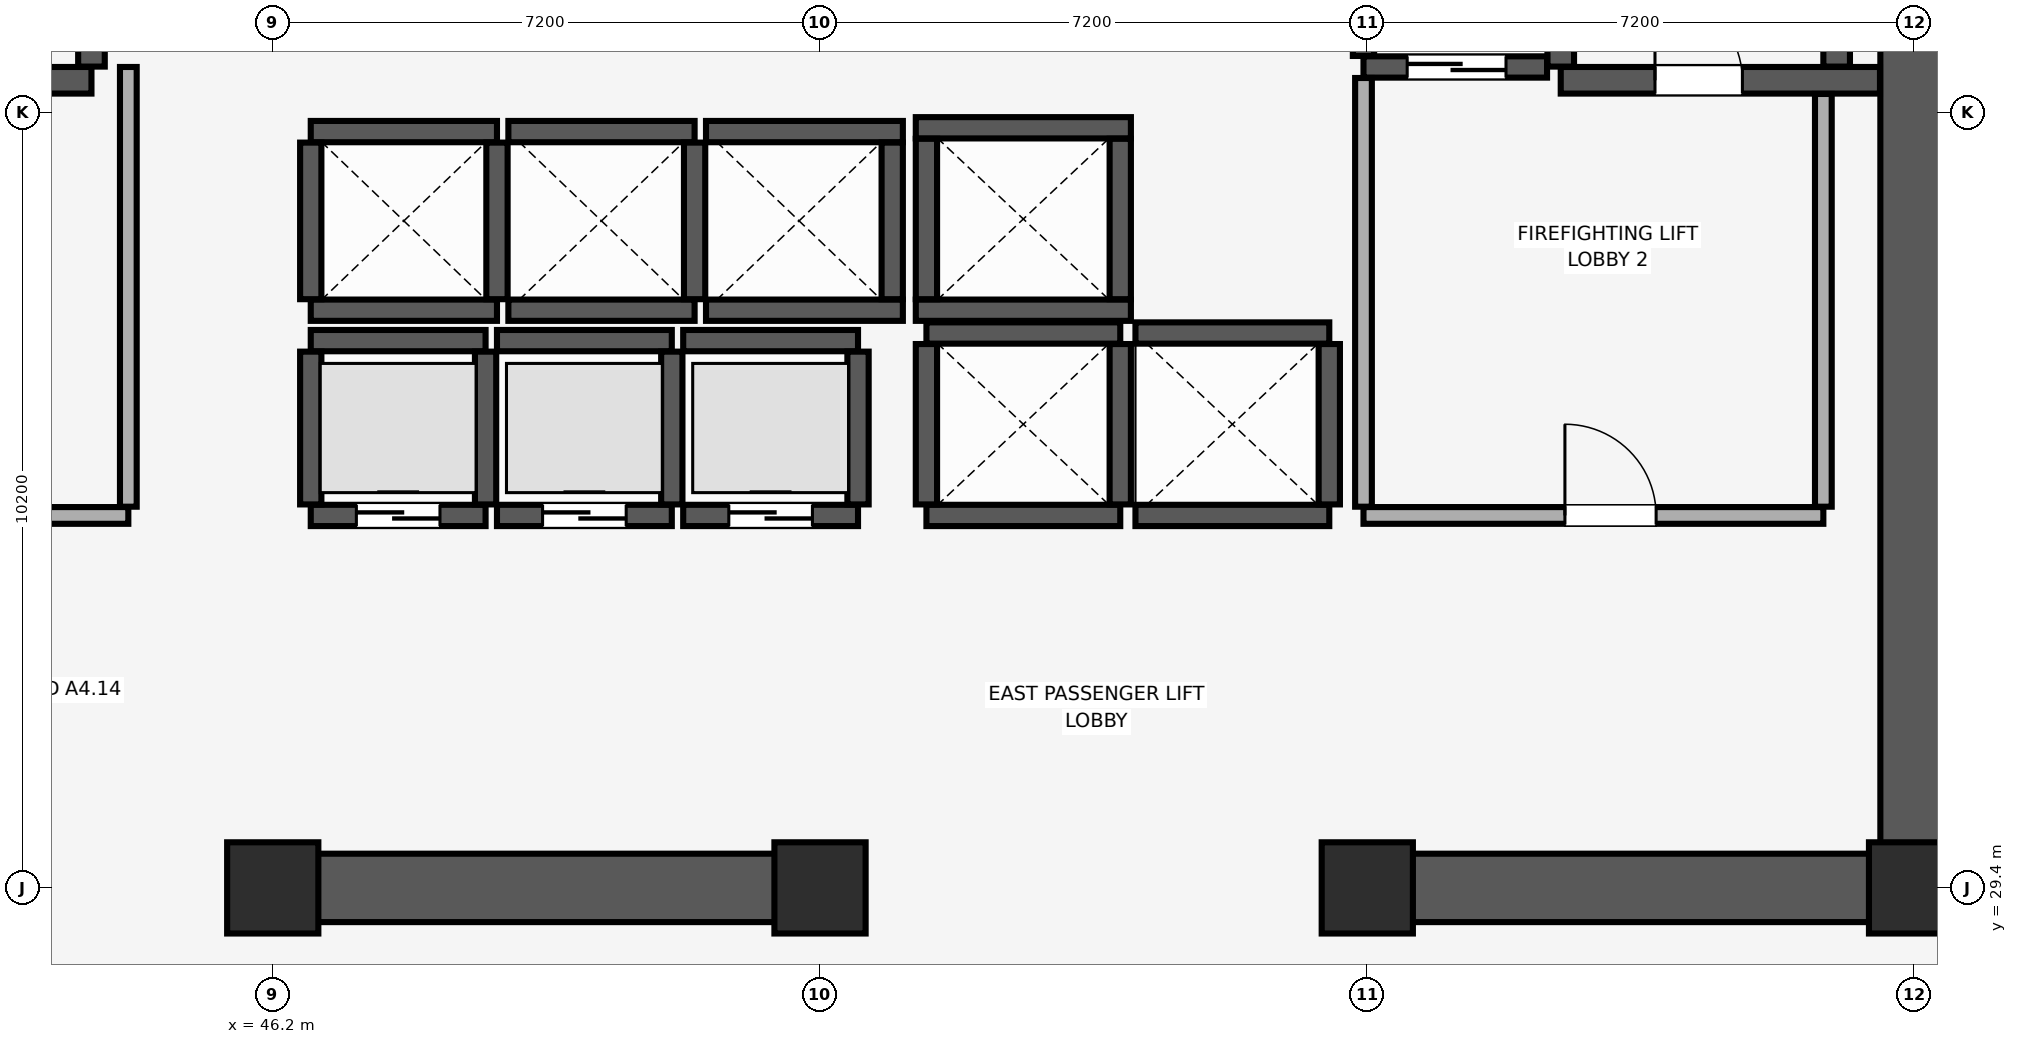
"""IFC4 building model, lengths in metres.
Left out: names, types, materials, properties, quantities, classifications, styles, units other than length and angle.
Written with IfcOpenShell. Run it as: python <this file> out.ifc"""

import sys

from ifc_helpers import new_model, si_unit, direction, frame, frame_2d, origin, origin_2d, place, context, subcontext, project, spatial, rectangle, extrude, element, fill, save


model = new_model("IFC4")
c1 = context("Model", 3, precision=1e-05, world=origin(), true_north=direction((0.0, 1.0)))
c2 = subcontext(c1, "Body", "Model", "MODEL_VIEW")
j1 = project(units=[si_unit("LENGTHUNIT", "METRE"), si_unit("PLANEANGLEUNIT", "RADIAN")], contexts=[c1])
p1 = place(None, origin())
s1 = spatial("IfcSite", under=j1, at=p1, CompositionType="ELEMENT")
p2 = place(p1, origin())
s2 = spatial("IfcBuilding", under=s1, at=p2, CompositionType="ELEMENT")
p3 = place(p2, frame((0.0, 0.0, 184.75)))
s3 = spatial("IfcBuildingStorey", under=s2, at=p3, CompositionType="ELEMENT", Elevation=184.75)
for number, where, z_axis, x_axis in (
    (1, (46.2, 29.4, 0.0), (0.0, 0.0, 1.0), (1.0, 0.0, 0.0)),
    (2, (53.4, 29.4, 0.0), (0.0, 0.0, 1.0), (1.0, 0.0, 0.0)),
    (3, (60.6, 29.4, 0.0), (0.0, 0.0, 1.0), (1.0, 0.0, 0.0)),
    (4, (67.8, 29.4, 0.0), (0.0, 0.0, 1.0), (1.0, 0.0, 0.0)),
):
    element("IfcColumn", number, at=place(p3, frame(where, z_axis=z_axis, x_axis=x_axis)), inside=s3, PredefinedType="COLUMN", context=c2, shape_type="SweptSolid", body=[
        extrude(rectangle(XDim=1.2, YDim=1.2, at=origin_2d()), origin(), (0.0, 0.0, 1.0), 5.16),
    ])
p4 = place(p3, frame((67.8, 29.4, 0.0), z_axis=(0.0, 0.0, 1.0), x_axis=(0.0, 1.0, 0.0)))
e5 = element("IfcWall", 5, at=p4, inside=s3, PredefinedType="SHEAR", context=c2, shape_type="SweptSolid", body=[
    extrude(rectangle(XDim=19.2, YDim=0.9, at=frame_2d((9.6, 0.0))), origin(), (0.0, 0.0, 1.0), 5.16),
])
p5 = place(p3, frame((46.0, 29.4, 0.0), z_axis=(0.0, 0.0, 1.0), x_axis=(1.0, 0.0, 0.0)))
e6 = element("IfcWall", 6, at=p5, inside=s3, PredefinedType="SHEAR", context=c2, shape_type="SweptSolid", body=[
    extrude(rectangle(XDim=7.6, YDim=0.9, at=frame_2d((3.8, 0.0))), origin(), (0.0, 0.0, 1.0), 5.16),
])
p6 = place(p3, frame((60.4, 29.4, 0.0), z_axis=(0.0, 0.0, 1.0), x_axis=(1.0, 0.0, 0.0)))
e7 = element("IfcWall", 7, at=p6, inside=s3, PredefinedType="SHEAR", context=c2, shape_type="SweptSolid", body=[
    extrude(rectangle(XDim=6.945, YDim=0.9, at=frame_2d((3.473, 0.0))), origin(), (0.0, 0.0, 1.0), 5.16),
])
p7 = place(p3, frame((40.185, 40.025, 0.0), z_axis=(0.0, 0.0, 1.0), x_axis=(1.0, 0.0, 0.0)))
e8 = element("IfcWall", 8, at=p7, inside=s3, PredefinedType="SHEAR", context=c2, shape_type="SweptSolid", body=[
    extrude(rectangle(XDim=3.63, YDim=0.35, at=frame_2d((1.815, 0.0))), origin(), (0.0, 0.0, 1.0), 5.16),
])
p8 = place(p7, frame((1.24, 0.0, 0.0)))
e9 = element("IfcOpeningElement", 9, at=p8, cuts=e8, PredefinedType="OPENING", context=c2, shape_type="SweptSolid", body=[
    extrude(rectangle(XDim=1.15, YDim=2.15, at=frame_2d((0.575, 1.075))), frame((0.0, 0.185, 0.0), z_axis=(0.0, -1.0, 0.0), x_axis=(1.0, 0.0, 0.0)), (0.0, 0.0, 1.0), 0.37),
])
p9 = place(p3, frame((43.815, 40.205, 0.0), z_axis=(0.0, 0.0, 1.0), x_axis=(0.0, 1.0, 0.0)))
e10 = element("IfcWall", 10, at=p9, inside=s3, PredefinedType="SHEAR", context=c2, shape_type="SweptSolid", body=[
    extrude(rectangle(XDim=8.09, YDim=0.35, at=frame_2d((4.045, 0.0))), origin(), (0.0, 0.0, 1.0), 5.16),
])
p10 = place(p3, frame((63.145, 40.025, 0.0), z_axis=(0.0, 0.0, 1.0), x_axis=(1.0, 0.0, 0.0)))
e11 = element("IfcWall", 11, at=p10, inside=s3, PredefinedType="SHEAR", context=c2, shape_type="SweptSolid", body=[
    extrude(rectangle(XDim=4.2, YDim=0.35, at=frame_2d((2.1, 0.0))), origin(), (0.0, 0.0, 1.0), 5.16),
])
p11 = place(p10, frame((1.24, 0.0, 0.0)))
e12 = element("IfcOpeningElement", 12, at=p11, cuts=e11, PredefinedType="OPENING", context=c2, shape_type="SweptSolid", body=[
    extrude(rectangle(XDim=1.15, YDim=2.15, at=frame_2d((0.575, 1.075))), frame((0.0, 0.185, 0.0), z_axis=(0.0, -1.0, 0.0), x_axis=(1.0, 0.0, 0.0)), (0.0, 0.0, 1.0), 0.37),
])
for number, where, z_axis, x_axis in (
    (13, (63.145, 40.205, 0.0), (0.0, 0.0, 1.0), (0.0, 1.0, 0.0)),
    (14, (66.775, 40.205, 0.0), (0.0, 0.0, 1.0), (0.0, 1.0, 0.0)),
):
    element("IfcWall", number, at=place(p3, frame(where, z_axis=z_axis, x_axis=x_axis)), inside=s3, PredefinedType="SHEAR", context=c2, shape_type="SweptSolid", body=[
        extrude(rectangle(XDim=8.09, YDim=0.35, at=frame_2d((4.045, 0.0))), origin(), (0.0, 0.0, 1.0), 5.16),
    ])
p12 = place(p3, frame((46.7, 34.3, 0.0), z_axis=(0.0, 0.0, 1.0), x_axis=(1.0, 0.0, 0.0)))
e15 = element("IfcWall", 15, at=p12, inside=s3, PredefinedType="SHEAR", context=c2, shape_type="SweptSolid", body=[
    extrude(rectangle(XDim=2.3, YDim=0.28, at=frame_2d((1.15, 0.0))), origin(), (0.0, 0.0, 1.0), 5.16),
])
p13 = place(p12, frame((0.6, 0.0, 0.0)))
e16 = element("IfcOpeningElement", 16, at=p13, cuts=e15, PredefinedType="OPENING", context=c2, shape_type="SweptSolid", body=[
    extrude(rectangle(XDim=1.1, YDim=2.2, at=frame_2d((0.55, 1.1))), frame((0.0, 0.15, 0.0), z_axis=(0.0, -1.0, 0.0), x_axis=(1.0, 0.0, 0.0)), (0.0, 0.0, 1.0), 0.3),
])
p14 = place(p3, frame((46.7, 36.6, 0.0), z_axis=(0.0, 0.0, 1.0), x_axis=(1.0, 0.0, 0.0)))
e17 = element("IfcWall", 17, at=p14, inside=s3, PredefinedType="SHEAR", context=c2, shape_type="SweptSolid", body=[
    extrude(rectangle(XDim=2.3, YDim=0.28, at=frame_2d((1.15, 0.0))), origin(), (0.0, 0.0, 1.0), 5.16),
])
for number, where, z_axis, x_axis in (
    (18, (46.7, 34.445, 0.0), (0.0, 0.0, 1.0), (0.0, 1.0, 0.0)),
    (19, (49.0, 34.445, 0.0), (0.0, 0.0, 1.0), (0.0, 1.0, 0.0)),
):
    element("IfcWall", number, at=place(p3, frame(where, z_axis=z_axis, x_axis=x_axis)), inside=s3, PredefinedType="SHEAR", context=c2, shape_type="SweptSolid", body=[
        extrude(rectangle(XDim=2.01, YDim=0.28, at=frame_2d((1.005, 0.0))), origin(), (0.0, 0.0, 1.0), 5.16),
    ])
p15 = place(p3, frame((49.15, 34.3, 0.0), z_axis=(0.0, 0.0, 1.0), x_axis=(1.0, 0.0, 0.0)))
e20 = element("IfcWall", 20, at=p15, inside=s3, PredefinedType="SHEAR", context=c2, shape_type="SweptSolid", body=[
    extrude(rectangle(XDim=2.3, YDim=0.28, at=frame_2d((1.15, 0.0))), origin(), (0.0, 0.0, 1.0), 5.16),
])
p16 = place(p15, frame((0.6, 0.0, 0.0)))
e21 = element("IfcOpeningElement", 21, at=p16, cuts=e20, PredefinedType="OPENING", context=c2, shape_type="SweptSolid", body=[
    extrude(rectangle(XDim=1.1, YDim=2.2, at=frame_2d((0.55, 1.1))), frame((0.0, 0.15, 0.0), z_axis=(0.0, -1.0, 0.0), x_axis=(1.0, 0.0, 0.0)), (0.0, 0.0, 1.0), 0.3),
])
p17 = place(p3, frame((49.15, 36.6, 0.0), z_axis=(0.0, 0.0, 1.0), x_axis=(1.0, 0.0, 0.0)))
e22 = element("IfcWall", 22, at=p17, inside=s3, PredefinedType="SHEAR", context=c2, shape_type="SweptSolid", body=[
    extrude(rectangle(XDim=2.3, YDim=0.28, at=frame_2d((1.15, 0.0))), origin(), (0.0, 0.0, 1.0), 5.16),
])
p18 = place(p3, frame((51.45, 34.445, 0.0), z_axis=(0.0, 0.0, 1.0), x_axis=(0.0, 1.0, 0.0)))
e23 = element("IfcWall", 23, at=p18, inside=s3, PredefinedType="SHEAR", context=c2, shape_type="SweptSolid", body=[
    extrude(rectangle(XDim=2.01, YDim=0.28, at=frame_2d((1.005, 0.0))), origin(), (0.0, 0.0, 1.0), 5.16),
])
p19 = place(p3, frame((51.6, 34.3, 0.0), z_axis=(0.0, 0.0, 1.0), x_axis=(1.0, 0.0, 0.0)))
e24 = element("IfcWall", 24, at=p19, inside=s3, PredefinedType="SHEAR", context=c2, shape_type="SweptSolid", body=[
    extrude(rectangle(XDim=2.3, YDim=0.28, at=frame_2d((1.15, 0.0))), origin(), (0.0, 0.0, 1.0), 5.16),
])
p20 = place(p19, frame((0.6, 0.0, 0.0)))
e25 = element("IfcOpeningElement", 25, at=p20, cuts=e24, PredefinedType="OPENING", context=c2, shape_type="SweptSolid", body=[
    extrude(rectangle(XDim=1.1, YDim=2.2, at=frame_2d((0.55, 1.1))), frame((0.0, 0.15, 0.0), z_axis=(0.0, -1.0, 0.0), x_axis=(1.0, 0.0, 0.0)), (0.0, 0.0, 1.0), 0.3),
])
p21 = place(p3, frame((51.6, 36.6, 0.0), z_axis=(0.0, 0.0, 1.0), x_axis=(1.0, 0.0, 0.0)))
e26 = element("IfcWall", 26, at=p21, inside=s3, PredefinedType="SHEAR", context=c2, shape_type="SweptSolid", body=[
    extrude(rectangle(XDim=2.3, YDim=0.28, at=frame_2d((1.15, 0.0))), origin(), (0.0, 0.0, 1.0), 5.16),
])
p22 = place(p3, frame((53.9, 34.445, 0.0), z_axis=(0.0, 0.0, 1.0), x_axis=(0.0, 1.0, 0.0)))
e27 = element("IfcWall", 27, at=p22, inside=s3, PredefinedType="SHEAR", context=c2, shape_type="SweptSolid", body=[
    extrude(rectangle(XDim=2.01, YDim=0.28, at=frame_2d((1.005, 0.0))), origin(), (0.0, 0.0, 1.0), 5.16),
])
for number, where, z_axis, x_axis in (
    (28, (46.7, 37.0, 0.0), (0.0, 0.0, 1.0), (1.0, 0.0, 0.0)),
    (29, (46.7, 39.35, 0.0), (0.0, 0.0, 1.0), (1.0, 0.0, 0.0)),
):
    element("IfcWall", number, at=place(p3, frame(where, z_axis=z_axis, x_axis=x_axis)), inside=s3, PredefinedType="SHEAR", context=c2, shape_type="SweptSolid", body=[
        extrude(rectangle(XDim=2.45, YDim=0.28, at=frame_2d((1.225, 0.0))), origin(), (0.0, 0.0, 1.0), 5.16),
    ])
for number, where, z_axis, x_axis in (
    (30, (46.7, 37.145, 0.0), (0.0, 0.0, 1.0), (0.0, 1.0, 0.0)),
    (31, (49.15, 37.145, 0.0), (0.0, 0.0, 1.0), (0.0, 1.0, 0.0)),
):
    element("IfcWall", number, at=place(p3, frame(where, z_axis=z_axis, x_axis=x_axis)), inside=s3, PredefinedType="SHEAR", context=c2, shape_type="SweptSolid", body=[
        extrude(rectangle(XDim=2.06, YDim=0.28, at=frame_2d((1.03, 0.0))), origin(), (0.0, 0.0, 1.0), 5.16),
    ])
for number, where, z_axis, x_axis in (
    (32, (49.3, 37.0, 0.0), (0.0, 0.0, 1.0), (1.0, 0.0, 0.0)),
    (33, (49.3, 39.35, 0.0), (0.0, 0.0, 1.0), (1.0, 0.0, 0.0)),
):
    element("IfcWall", number, at=place(p3, frame(where, z_axis=z_axis, x_axis=x_axis)), inside=s3, PredefinedType="SHEAR", context=c2, shape_type="SweptSolid", body=[
        extrude(rectangle(XDim=2.45, YDim=0.28, at=frame_2d((1.225, 0.0))), origin(), (0.0, 0.0, 1.0), 5.16),
    ])
p23 = place(p3, frame((51.75, 37.145, 0.0), z_axis=(0.0, 0.0, 1.0), x_axis=(0.0, 1.0, 0.0)))
e34 = element("IfcWall", 34, at=p23, inside=s3, PredefinedType="SHEAR", context=c2, shape_type="SweptSolid", body=[
    extrude(rectangle(XDim=2.06, YDim=0.28, at=frame_2d((1.03, 0.0))), origin(), (0.0, 0.0, 1.0), 5.16),
])
for number, where, z_axis, x_axis in (
    (35, (51.9, 37.0, 0.0), (0.0, 0.0, 1.0), (1.0, 0.0, 0.0)),
    (36, (51.9, 39.35, 0.0), (0.0, 0.0, 1.0), (1.0, 0.0, 0.0)),
):
    element("IfcWall", number, at=place(p3, frame(where, z_axis=z_axis, x_axis=x_axis)), inside=s3, PredefinedType="SHEAR", context=c2, shape_type="SweptSolid", body=[
        extrude(rectangle(XDim=2.59, YDim=0.28, at=frame_2d((1.295, 0.0))), origin(), (0.0, 0.0, 1.0), 5.16),
    ])
p24 = place(p3, frame((54.35, 37.145, 0.0), z_axis=(0.0, 0.0, 1.0), x_axis=(0.0, 1.0, 0.0)))
e37 = element("IfcWall", 37, at=p24, inside=s3, PredefinedType="SHEAR", context=c2, shape_type="SweptSolid", body=[
    extrude(rectangle(XDim=2.06, YDim=0.28, at=frame_2d((1.03, 0.0))), origin(), (0.0, 0.0, 1.0), 5.16),
])
for number, where, z_axis, x_axis in (
    (38, (54.8, 34.3, 0.0), (0.0, 0.0, 1.0), (1.0, 0.0, 0.0)),
    (39, (54.8, 36.7, 0.0), (0.0, 0.0, 1.0), (1.0, 0.0, 0.0)),
):
    element("IfcWall", number, at=place(p3, frame(where, z_axis=z_axis, x_axis=x_axis)), inside=s3, PredefinedType="SHEAR", context=c2, shape_type="SweptSolid", body=[
        extrude(rectangle(XDim=2.55, YDim=0.28, at=frame_2d((1.275, 0.0))), origin(), (0.0, 0.0, 1.0), 5.16),
    ])
for number, where, z_axis, x_axis in (
    (40, (54.8, 34.445, 0.0), (0.0, 0.0, 1.0), (0.0, 1.0, 0.0)),
    (41, (57.35, 34.445, 0.0), (0.0, 0.0, 1.0), (0.0, 1.0, 0.0)),
):
    element("IfcWall", number, at=place(p3, frame(where, z_axis=z_axis, x_axis=x_axis)), inside=s3, PredefinedType="SHEAR", context=c2, shape_type="SweptSolid", body=[
        extrude(rectangle(XDim=2.11, YDim=0.28, at=frame_2d((1.055, 0.0))), origin(), (0.0, 0.0, 1.0), 5.16),
    ])
for number, where, z_axis, x_axis in (
    (42, (57.55, 34.3, 0.0), (0.0, 0.0, 1.0), (1.0, 0.0, 0.0)),
    (43, (57.55, 36.7, 0.0), (0.0, 0.0, 1.0), (1.0, 0.0, 0.0)),
):
    element("IfcWall", number, at=place(p3, frame(where, z_axis=z_axis, x_axis=x_axis)), inside=s3, PredefinedType="SHEAR", context=c2, shape_type="SweptSolid", body=[
        extrude(rectangle(XDim=2.55, YDim=0.28, at=frame_2d((1.275, 0.0))), origin(), (0.0, 0.0, 1.0), 5.16),
    ])
p25 = place(p3, frame((60.1, 34.445, 0.0), z_axis=(0.0, 0.0, 1.0), x_axis=(0.0, 1.0, 0.0)))
e44 = element("IfcWall", 44, at=p25, inside=s3, PredefinedType="SHEAR", context=c2, shape_type="SweptSolid", body=[
    extrude(rectangle(XDim=2.11, YDim=0.28, at=frame_2d((1.055, 0.0))), origin(), (0.0, 0.0, 1.0), 5.16),
])
for number, where, z_axis, x_axis in (
    (45, (54.66, 37.0, 0.0), (0.0, 0.0, 1.0), (1.0, 0.0, 0.0)),
    (46, (54.66, 39.4, 0.0), (0.0, 0.0, 1.0), (1.0, 0.0, 0.0)),
):
    element("IfcWall", number, at=place(p3, frame(where, z_axis=z_axis, x_axis=x_axis)), inside=s3, PredefinedType="SHEAR", context=c2, shape_type="SweptSolid", body=[
        extrude(rectangle(XDim=2.83, YDim=0.28, at=frame_2d((1.415, 0.0))), origin(), (0.0, 0.0, 1.0), 5.16),
    ])
for number, where, z_axis, x_axis in (
    (47, (54.8, 37.145, 0.0), (0.0, 0.0, 1.0), (0.0, 1.0, 0.0)),
    (48, (57.35, 37.145, 0.0), (0.0, 0.0, 1.0), (0.0, 1.0, 0.0)),
):
    element("IfcWall", number, at=place(p3, frame(where, z_axis=z_axis, x_axis=x_axis)), inside=s3, PredefinedType="SHEAR", context=c2, shape_type="SweptSolid", body=[
        extrude(rectangle(XDim=2.11, YDim=0.28, at=frame_2d((1.055, 0.0))), origin(), (0.0, 0.0, 1.0), 5.16),
    ])
p26 = place(p3, frame((60.55, 40.2, 0.0), z_axis=(0.0, 0.0, 1.0), x_axis=(1.0, 0.0, 0.0)))
e49 = element("IfcWall", 49, at=p26, inside=s3, PredefinedType="SHEAR", context=c2, shape_type="SweptSolid", body=[
    extrude(rectangle(XDim=2.415, YDim=0.28, at=frame_2d((1.208, 0.0))), origin(), (0.0, 0.0, 1.0), 5.16),
])
p27 = place(p26, frame((0.575, 0.0, 0.0)))
e50 = element("IfcOpeningElement", 50, at=p27, cuts=e49, PredefinedType="OPENING", context=c2, shape_type="SweptSolid", body=[
    extrude(rectangle(XDim=1.3, YDim=2.3, at=frame_2d((0.65, 1.15))), frame((0.0, 0.15, 0.0), z_axis=(0.0, -1.0, 0.0), x_axis=(1.0, 0.0, 0.0)), (0.0, 0.0, 1.0), 0.3),
])
p28 = place(p3, frame((60.55, 40.345, 0.0), z_axis=(0.0, 0.0, 1.0), x_axis=(0.0, 1.0, 0.0)))
e51 = element("IfcWall", 51, at=p28, inside=s3, PredefinedType="SHEAR", context=c2, shape_type="SweptSolid", body=[
    extrude(rectangle(XDim=2.81, YDim=0.28, at=frame_2d((1.405, 0.0))), origin(), (0.0, 0.0, 1.0), 5.16),
])
p29 = place(p3, frame((60.55, 34.3, 0.0), z_axis=(0.0, 0.0, 1.0), x_axis=(1.0, 0.0, 0.0)))
e52 = element("IfcWall", 52, at=p29, inside=s3, PredefinedType="PARTITIONING", context=c2, shape_type="SweptSolid", body=[
    extrude(rectangle(XDim=6.05, YDim=0.22, at=frame_2d((3.025, 0.0))), origin(), (0.0, 0.0, 1.0), 5.16),
])
p30 = place(p29, frame((2.65, 0.0, 0.0)))
e53 = element("IfcOpeningElement", 53, at=p30, cuts=e52, PredefinedType="OPENING", context=c2, shape_type="SweptSolid", body=[
    extrude(rectangle(XDim=1.2, YDim=2.15, at=frame_2d((0.6, 1.075))), frame((0.0, 0.12, 0.0), z_axis=(0.0, -1.0, 0.0), x_axis=(1.0, 0.0, 0.0)), (0.0, 0.0, 1.0), 0.24),
])
p31 = place(p3, frame((60.55, 34.415, 0.0), z_axis=(0.0, 0.0, 1.0), x_axis=(0.0, 1.0, 0.0)))
e54 = element("IfcWall", 54, at=p31, inside=s3, PredefinedType="PARTITIONING", context=c2, shape_type="SweptSolid", body=[
    extrude(rectangle(XDim=5.64, YDim=0.22, at=frame_2d((2.82, 0.0))), origin(), (0.0, 0.0, 1.0), 5.16),
])
p32 = place(p3, frame((66.6, 34.415, 0.0), z_axis=(0.0, 0.0, 1.0), x_axis=(0.0, 1.0, 0.0)))
e55 = element("IfcWall", 55, at=p32, inside=s3, PredefinedType="PARTITIONING", context=c2, shape_type="SweptSolid", body=[
    extrude(rectangle(XDim=5.43, YDim=0.22, at=frame_2d((2.715, 0.0))), origin(), (0.0, 0.0, 1.0), 5.16),
])
p33 = place(p3, frame((39.7, 34.3, 0.0), z_axis=(0.0, 0.0, 1.0), x_axis=(1.0, 0.0, 0.0)))
e56 = element("IfcWall", 56, at=p33, inside=s3, PredefinedType="PARTITIONING", context=c2, shape_type="SweptSolid", body=[
    extrude(rectangle(XDim=4.6, YDim=0.22, at=frame_2d((2.3, 0.0))), origin(), (0.0, 0.0, 1.0), 5.16),
])
p34 = place(p33, frame((1.7, 0.0, 0.0)))
e57 = element("IfcOpeningElement", 57, at=p34, cuts=e56, PredefinedType="OPENING", context=c2, shape_type="SweptSolid", body=[
    extrude(rectangle(XDim=1.2, YDim=2.15, at=frame_2d((0.6, 1.075))), frame((0.0, 0.12, 0.0), z_axis=(0.0, -1.0, 0.0), x_axis=(1.0, 0.0, 0.0)), (0.0, 0.0, 1.0), 0.24),
])
p35 = place(p3, frame((44.3, 34.415, 0.0), z_axis=(0.0, 0.0, 1.0), x_axis=(0.0, 1.0, 0.0)))
e58 = element("IfcWall", 58, at=p35, inside=s3, PredefinedType="PARTITIONING", context=c2, shape_type="SweptSolid", body=[
    extrude(rectangle(XDim=5.785, YDim=0.22, at=frame_2d((2.893, 0.0))), origin(), (0.0, 0.0, 1.0), 5.16),
])
p36 = place(p11, origin())
e59 = element("IfcDoor", 59, at=p36, inside=s3, OperationType="SINGLE_SWING_LEFT", PredefinedType="DOOR", context=c2, shape_type="SweptSolid", body=[
    extrude(rectangle(XDim=1.15, YDim=2.15, at=frame_2d((0.575, 1.075))), frame((0.0, 0.025, 0.0), z_axis=(0.0, -1.0, 0.0), x_axis=(1.0, 0.0, 0.0)), (0.0, 0.0, 1.0), 0.05),
])
fill(e12, e59)
p37 = place(p13, origin())
e60 = element("IfcDoor", 60, at=p37, inside=s3, OperationType="DOUBLE_DOOR_SLIDING", PredefinedType="DOOR", context=c2, shape_type="SweptSolid", body=[
    extrude(rectangle(XDim=1.1, YDim=2.2, at=frame_2d((0.55, 1.1))), frame((0.0, 0.025, 0.0), z_axis=(0.0, -1.0, 0.0), x_axis=(1.0, 0.0, 0.0)), (0.0, 0.0, 1.0), 0.05),
])
fill(e16, e60)
p38 = place(p16, origin())
e61 = element("IfcDoor", 61, at=p38, inside=s3, OperationType="DOUBLE_DOOR_SLIDING", PredefinedType="DOOR", context=c2, shape_type="SweptSolid", body=[
    extrude(rectangle(XDim=1.1, YDim=2.2, at=frame_2d((0.55, 1.1))), frame((0.0, 0.025, 0.0), z_axis=(0.0, -1.0, 0.0), x_axis=(1.0, 0.0, 0.0)), (0.0, 0.0, 1.0), 0.05),
])
fill(e21, e61)
p39 = place(p20, origin())
e62 = element("IfcDoor", 62, at=p39, inside=s3, OperationType="DOUBLE_DOOR_SLIDING", PredefinedType="DOOR", context=c2, shape_type="SweptSolid", body=[
    extrude(rectangle(XDim=1.1, YDim=2.2, at=frame_2d((0.55, 1.1))), frame((0.0, 0.025, 0.0), z_axis=(0.0, -1.0, 0.0), x_axis=(1.0, 0.0, 0.0)), (0.0, 0.0, 1.0), 0.05),
])
fill(e25, e62)
p40 = place(p27, origin())
e63 = element("IfcDoor", 63, at=p40, inside=s3, OperationType="DOUBLE_DOOR_SLIDING", PredefinedType="DOOR", context=c2, shape_type="SweptSolid", body=[
    extrude(rectangle(XDim=1.3, YDim=2.3, at=frame_2d((0.65, 1.15))), frame((0.0, 0.025, 0.0), z_axis=(0.0, -1.0, 0.0), x_axis=(1.0, 0.0, 0.0)), (0.0, 0.0, 1.0), 0.05),
])
fill(e50, e63)
p41 = place(p30, origin())
e64 = element("IfcDoor", 64, at=p41, inside=s3, OperationType="SINGLE_SWING_LEFT", PredefinedType="DOOR", context=c2, shape_type="SweptSolid", body=[
    extrude(rectangle(XDim=1.2, YDim=2.15, at=frame_2d((0.6, 1.075))), frame((0.0, 0.025, 0.0), z_axis=(0.0, -1.0, 0.0), x_axis=(1.0, 0.0, 0.0)), (0.0, 0.0, 1.0), 0.05),
])
fill(e53, e64)
save(model, sys.argv[1])
